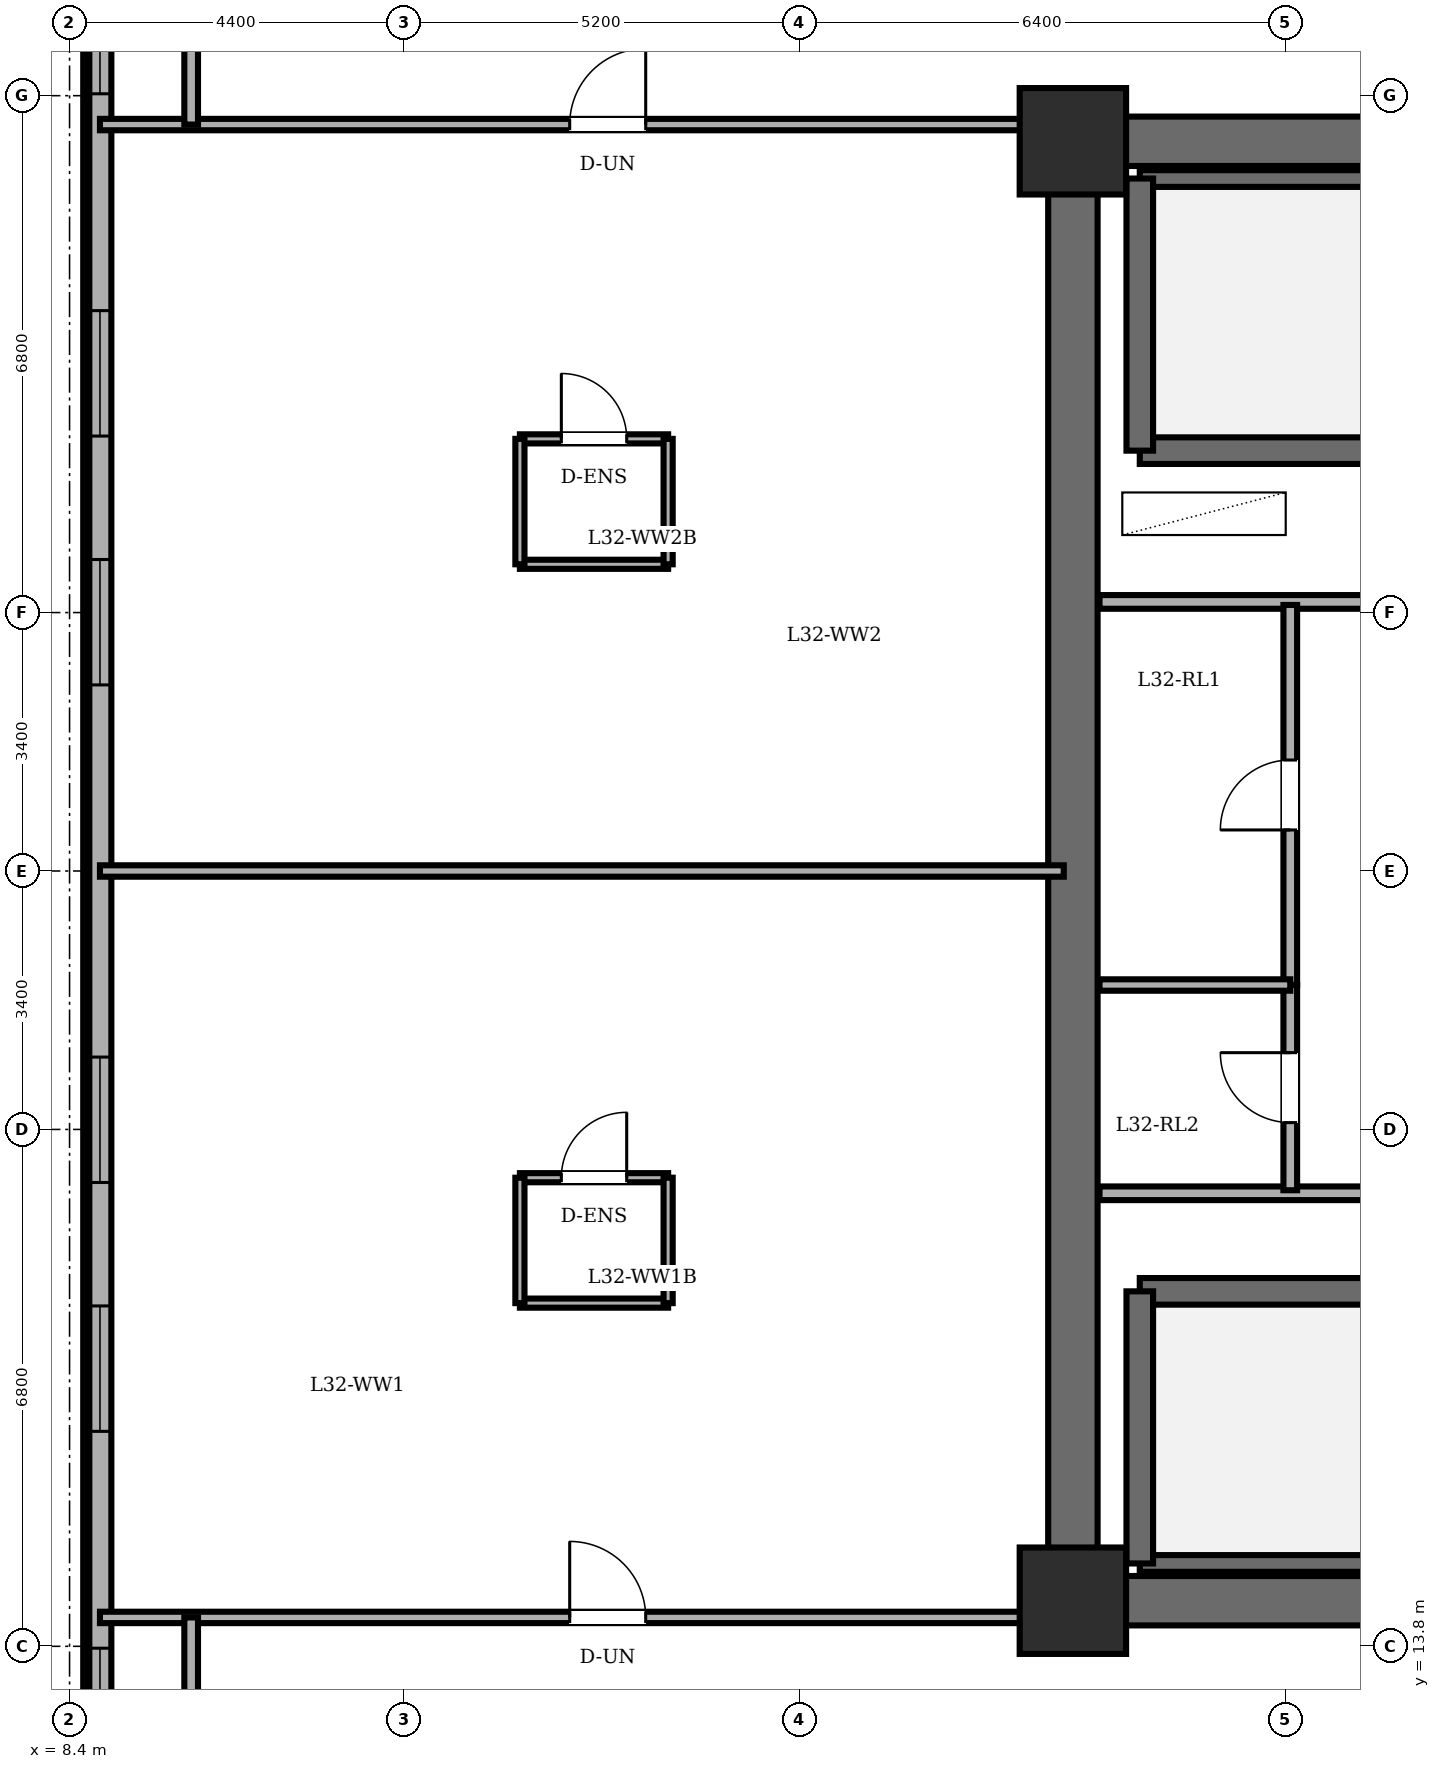
"""IFC4 building model, lengths in metres.
Left out: names, types, materials, properties, quantities, classifications, styles, units other than length and angle.
Written with IfcOpenShell. Run it as: python <this file> out.ifc"""

import sys

from ifc_helpers import new_model, si_unit, direction, frame, frame_2d, origin, origin_2d, place, context, subcontext, project, spatial, rectangle, extrude, element, fill, save


model = new_model("IFC4")
c1 = context("Model", 3, precision=1e-05, world=origin(), true_north=direction((0.0, 1.0)))
c2 = subcontext(c1, "Body", "Model", "MODEL_VIEW")
j1 = project(units=[si_unit("LENGTHUNIT", "METRE"), si_unit("PLANEANGLEUNIT", "RADIAN")], contexts=[c1])
p1 = place(None, origin())
s1 = spatial("IfcSite", under=j1, at=p1, CompositionType="ELEMENT")
p2 = place(p1, origin())
s2 = spatial("IfcBuilding", under=s1, at=p2, CompositionType="ELEMENT")
p3 = place(p2, frame((0.0, 0.0, 122.3)))
s3 = spatial("IfcBuildingStorey", under=s2, at=p3, CompositionType="ELEMENT", Elevation=122.3)
for number, where, z_axis, x_axis in (
    (1, (21.6, 14.4, 0.0), (0.0, 0.0, 1.0), (1.0, 0.0, 0.0)),
    (2, (21.6, 33.6, 0.0), (0.0, 0.0, 1.0), (1.0, 0.0, 0.0)),
):
    element("IfcColumn", number, at=place(p3, frame(where, z_axis=z_axis, x_axis=x_axis)), inside=s3, PredefinedType="COLUMN", context=c2, shape_type="SweptSolid", body=[
        extrude(rectangle(XDim=1.4, YDim=1.4, at=origin_2d()), origin(), (0.0, 0.0, 1.0), 3.6),
    ])
p4 = place(p3, frame((8.8, 38.2, 0.0), z_axis=(0.0, 0.0, 1.0), x_axis=(0.0, -1.0, 0.0)))
e3 = element("IfcWall", 3, at=p4, inside=s3, PredefinedType="SOLIDWALL", context=c2, shape_type="SweptSolid", body=[
    extrude(rectangle(XDim=28.4, YDim=0.3, at=frame_2d((14.2, 0.0))), origin(), (0.0, 0.0, 1.0), 3.4),
])
p5 = place(p4, frame((2.325, 0.0, 0.85)))
e4 = element("IfcOpeningElement", 4, at=p5, cuts=e3, PredefinedType="OPENING", context=c2, shape_type="SweptSolid", body=[
    extrude(rectangle(XDim=1.65, YDim=1.55, at=frame_2d((0.825, 0.775))), frame((0.0, 0.16, 0.0), z_axis=(0.0, -1.0, 0.0), x_axis=(1.0, 0.0, 0.0)), (0.0, 0.0, 1.0), 0.32),
])
p6 = place(p4, frame((6.828, 0.0, 0.85)))
e5 = element("IfcOpeningElement", 5, at=p6, cuts=e3, PredefinedType="OPENING", context=c2, shape_type="SweptSolid", body=[
    extrude(rectangle(XDim=1.65, YDim=1.55, at=frame_2d((0.825, 0.775))), frame((0.0, 0.16, 0.0), z_axis=(0.0, -1.0, 0.0), x_axis=(1.0, 0.0, 0.0)), (0.0, 0.0, 1.0), 0.32),
])
p7 = place(p4, frame((10.102, 0.0, 0.85)))
e6 = element("IfcOpeningElement", 6, at=p7, cuts=e3, PredefinedType="OPENING", context=c2, shape_type="SweptSolid", body=[
    extrude(rectangle(XDim=1.65, YDim=1.55, at=frame_2d((0.825, 0.775))), frame((0.0, 0.16, 0.0), z_axis=(0.0, -1.0, 0.0), x_axis=(1.0, 0.0, 0.0)), (0.0, 0.0, 1.0), 0.32),
])
p8 = place(p4, frame((16.648, 0.0, 0.85)))
e7 = element("IfcOpeningElement", 7, at=p8, cuts=e3, PredefinedType="OPENING", context=c2, shape_type="SweptSolid", body=[
    extrude(rectangle(XDim=1.65, YDim=1.55, at=frame_2d((0.825, 0.775))), frame((0.0, 0.16, 0.0), z_axis=(0.0, -1.0, 0.0), x_axis=(1.0, 0.0, 0.0)), (0.0, 0.0, 1.0), 0.32),
])
p9 = place(p4, frame((19.922, 0.0, 0.85)))
e8 = element("IfcOpeningElement", 8, at=p9, cuts=e3, PredefinedType="OPENING", context=c2, shape_type="SweptSolid", body=[
    extrude(rectangle(XDim=1.65, YDim=1.55, at=frame_2d((0.825, 0.775))), frame((0.0, 0.16, 0.0), z_axis=(0.0, -1.0, 0.0), x_axis=(1.0, 0.0, 0.0)), (0.0, 0.0, 1.0), 0.32),
])
p10 = place(p4, frame((24.425, 0.0, 0.85)))
e9 = element("IfcOpeningElement", 9, at=p10, cuts=e3, PredefinedType="OPENING", context=c2, shape_type="SweptSolid", body=[
    extrude(rectangle(XDim=1.65, YDim=1.55, at=frame_2d((0.825, 0.775))), frame((0.0, 0.16, 0.0), z_axis=(0.0, -1.0, 0.0), x_axis=(1.0, 0.0, 0.0)), (0.0, 0.0, 1.0), 0.32),
])
p11 = place(p3, frame((21.6, 14.4, 0.0), z_axis=(0.0, 0.0, 1.0), x_axis=(0.0, 1.0, 0.0)))
e10 = element("IfcWall", 10, at=p11, inside=s3, PredefinedType="SHEAR", context=c2, shape_type="SweptSolid", body=[
    extrude(rectangle(XDim=19.2, YDim=0.65, at=frame_2d((9.6, 0.0))), origin(), (0.0, 0.0, 1.0), 3.4),
])
for number, where, z_axis, x_axis in (
    (11, (21.6, 33.6, 0.0), (0.0, 0.0, 1.0), (1.0, 0.0, 0.0)),
    (12, (37.2, 14.4, 0.0), (0.0, 0.0, 1.0), (-1.0, 0.0, 0.0)),
):
    element("IfcWall", number, at=place(p3, frame(where, z_axis=z_axis, x_axis=x_axis)), inside=s3, PredefinedType="SHEAR", context=c2, shape_type="SweptSolid", body=[
        extrude(rectangle(XDim=15.6, YDim=0.65, at=frame_2d((7.8, 0.0))), origin(), (0.0, 0.0, 1.0), 3.4),
    ])
p12 = place(p3, frame((22.48, 29.53, 0.0), z_axis=(0.0, 0.0, 1.0), x_axis=(1.0, 0.0, 0.0)))
e13 = element("IfcWall", 13, at=p12, inside=s3, PredefinedType="SOLIDWALL", context=c2, shape_type="SweptSolid", body=[
    extrude(rectangle(XDim=7.79, YDim=0.35, at=frame_2d((3.895, 0.0))), origin(), (0.0, 0.0, 1.0), 3.4),
])
p13 = place(p3, frame((22.48, 33.11, 0.0), z_axis=(0.0, 0.0, 1.0), x_axis=(1.0, 0.0, 0.0)))
e14 = element("IfcWall", 14, at=p13, inside=s3, PredefinedType="PARTITIONING", context=c2, shape_type="SweptSolid", body=[
    extrude(rectangle(XDim=7.79, YDim=0.22, at=frame_2d((3.895, 0.0))), origin(), (0.0, 0.0, 1.0), 3.4),
])
p14 = place(p3, frame((22.48, 29.53, 0.0), z_axis=(0.0, 0.0, 1.0), x_axis=(0.0, 1.0, 0.0)))
e15 = element("IfcWall", 15, at=p14, inside=s3, PredefinedType="SOLIDWALL", context=c2, shape_type="SweptSolid", body=[
    extrude(rectangle(XDim=3.58, YDim=0.35, at=frame_2d((1.79, 0.0))), origin(), (0.0, 0.0, 1.0), 3.4),
])
p15 = place(p3, frame((22.48, 18.47, 0.0), z_axis=(0.0, 0.0, 1.0), x_axis=(1.0, 0.0, 0.0)))
e16 = element("IfcWall", 16, at=p15, inside=s3, PredefinedType="SOLIDWALL", context=c2, shape_type="SweptSolid", body=[
    extrude(rectangle(XDim=7.79, YDim=0.35, at=frame_2d((3.895, 0.0))), origin(), (0.0, 0.0, 1.0), 3.4),
])
p16 = place(p3, frame((22.48, 14.89, 0.0), z_axis=(0.0, 0.0, 1.0), x_axis=(1.0, 0.0, 0.0)))
e17 = element("IfcWall", 17, at=p16, inside=s3, PredefinedType="PARTITIONING", context=c2, shape_type="SweptSolid", body=[
    extrude(rectangle(XDim=7.79, YDim=0.22, at=frame_2d((3.895, 0.0))), origin(), (0.0, 0.0, 1.0), 3.4),
])
p17 = place(p3, frame((22.48, 14.89, 0.0), z_axis=(0.0, 0.0, 1.0), x_axis=(0.0, 1.0, 0.0)))
e18 = element("IfcWall", 18, at=p17, inside=s3, PredefinedType="SOLIDWALL", context=c2, shape_type="SweptSolid", body=[
    extrude(rectangle(XDim=3.58, YDim=0.35, at=frame_2d((1.79, 0.0))), origin(), (0.0, 0.0, 1.0), 3.4),
])
p18 = place(p3, frame((21.95, 27.54, 0.0), z_axis=(0.0, 0.0, 1.0), x_axis=(1.0, 0.0, 0.0)))
e19 = element("IfcWall", 19, at=p18, inside=s3, PredefinedType="PARTITIONING", context=c2, shape_type="SweptSolid", body=[
    extrude(rectangle(XDim=10.56, YDim=0.18, at=frame_2d((5.28, 0.0))), origin(), (0.0, 0.0, 1.0), 3.4),
])
p19 = place(p3, frame((21.95, 19.76, 0.0), z_axis=(0.0, 0.0, 1.0), x_axis=(1.0, 0.0, 0.0)))
e20 = element("IfcWall", 20, at=p19, inside=s3, PredefinedType="PARTITIONING", context=c2, shape_type="SweptSolid", body=[
    extrude(rectangle(XDim=14.87, YDim=0.18, at=frame_2d((7.435, 0.0))), origin(), (0.0, 0.0, 1.0), 3.4),
])
p20 = place(p3, frame((24.46, 22.5, 0.0), z_axis=(0.0, 0.0, 1.0), x_axis=(0.0, 1.0, 0.0)))
e21 = element("IfcWall", 21, at=p20, inside=s3, PredefinedType="PARTITIONING", context=c2, shape_type="SweptSolid", body=[
    extrude(rectangle(XDim=5.0, YDim=0.18, at=frame_2d((2.5, 0.0))), origin(), (0.0, 0.0, 1.0), 3.4),
])
p21 = place(p20, frame((2.04, 0.0, 0.0)))
e22 = element("IfcOpeningElement", 22, at=p21, cuts=e21, PredefinedType="OPENING", context=c2, shape_type="SweptSolid", body=[
    extrude(rectangle(XDim=0.92, YDim=2.1, at=frame_2d((0.46, 1.05))), frame((0.0, 0.1, 0.0), z_axis=(0.0, -1.0, 0.0), x_axis=(1.0, 0.0, 0.0)), (0.0, 0.0, 1.0), 0.2),
])
p22 = place(p3, frame((24.46, 19.8, 0.0), z_axis=(0.0, 0.0, 1.0), x_axis=(0.0, 1.0, 0.0)))
e23 = element("IfcWall", 23, at=p22, inside=s3, PredefinedType="PARTITIONING", context=c2, shape_type="SweptSolid", body=[
    extrude(rectangle(XDim=2.7, YDim=0.18, at=frame_2d((1.35, 0.0))), origin(), (0.0, 0.0, 1.0), 3.4),
])
p23 = place(p22, frame((0.89, 0.0, 0.0)))
e24 = element("IfcOpeningElement", 24, at=p23, cuts=e23, PredefinedType="OPENING", context=c2, shape_type="SweptSolid", body=[
    extrude(rectangle(XDim=0.92, YDim=2.1, at=frame_2d((0.46, 1.05))), frame((0.0, 0.1, 0.0), z_axis=(0.0, -1.0, 0.0), x_axis=(1.0, 0.0, 0.0)), (0.0, 0.0, 1.0), 0.2),
])
p24 = place(p3, frame((21.95, 22.5, 0.0), z_axis=(0.0, 0.0, 1.0), x_axis=(1.0, 0.0, 0.0)))
e25 = element("IfcWall", 25, at=p24, inside=s3, PredefinedType="PARTITIONING", context=c2, shape_type="SweptSolid", body=[
    extrude(rectangle(XDim=2.51, YDim=0.15, at=frame_2d((1.255, 0.0))), origin(), (0.0, 0.0, 1.0), 3.4),
])
p25 = place(p3, frame((14.325, 19.965, 0.0), z_axis=(0.0, 0.0, 1.0), x_axis=(1.0, 0.0, 0.0)))
e26 = element("IfcWall", 26, at=p25, inside=s3, PredefinedType="PARTITIONING", context=c2, shape_type="SweptSolid", body=[
    extrude(rectangle(XDim=1.95, YDim=0.12, at=frame_2d((0.975, 0.0))), origin(), (0.0, 0.0, 1.0), 3.4),
])
p26 = place(p25, frame((0.545, 0.0, 0.0)))
e27 = element("IfcOpeningElement", 27, at=p26, cuts=e26, PredefinedType="OPENING", context=c2, shape_type="SweptSolid", body=[
    extrude(rectangle(XDim=0.86, YDim=2.1, at=frame_2d((0.43, 1.05))), frame((0.0, 0.07, 0.0), z_axis=(0.0, -1.0, 0.0), x_axis=(1.0, 0.0, 0.0)), (0.0, 0.0, 1.0), 0.14),
])
p27 = place(p3, frame((16.275, 18.315, 0.0), z_axis=(0.0, 0.0, 1.0), x_axis=(-1.0, 0.0, 0.0)))
e28 = element("IfcWall", 28, at=p27, inside=s3, PredefinedType="PARTITIONING", context=c2, shape_type="SweptSolid", body=[
    extrude(rectangle(XDim=1.95, YDim=0.12, at=frame_2d((0.975, 0.0))), origin(), (0.0, 0.0, 1.0), 3.4),
])
for number, where, z_axis, x_axis in (
    (29, (14.325, 19.965, 0.0), (0.0, 0.0, 1.0), (0.0, -1.0, 0.0)),
    (30, (16.275, 18.315, 0.0), (0.0, 0.0, 1.0), (0.0, 1.0, 0.0)),
):
    element("IfcWall", number, at=place(p3, frame(where, z_axis=z_axis, x_axis=x_axis)), inside=s3, PredefinedType="PARTITIONING", context=c2, shape_type="SweptSolid", body=[
        extrude(rectangle(XDim=1.65, YDim=0.12, at=frame_2d((0.825, 0.0))), origin(), (0.0, 0.0, 1.0), 3.4),
    ])
p28 = place(p3, frame((14.325, 29.685, 0.0), z_axis=(0.0, 0.0, 1.0), x_axis=(1.0, 0.0, 0.0)))
e31 = element("IfcWall", 31, at=p28, inside=s3, PredefinedType="PARTITIONING", context=c2, shape_type="SweptSolid", body=[
    extrude(rectangle(XDim=1.95, YDim=0.12, at=frame_2d((0.975, 0.0))), origin(), (0.0, 0.0, 1.0), 3.4),
])
p29 = place(p28, frame((0.545, 0.0, 0.0)))
e32 = element("IfcOpeningElement", 32, at=p29, cuts=e31, PredefinedType="OPENING", context=c2, shape_type="SweptSolid", body=[
    extrude(rectangle(XDim=0.86, YDim=2.1, at=frame_2d((0.43, 1.05))), frame((0.0, 0.07, 0.0), z_axis=(0.0, -1.0, 0.0), x_axis=(1.0, 0.0, 0.0)), (0.0, 0.0, 1.0), 0.14),
])
p30 = place(p3, frame((16.275, 28.035, 0.0), z_axis=(0.0, 0.0, 1.0), x_axis=(-1.0, 0.0, 0.0)))
e33 = element("IfcWall", 33, at=p30, inside=s3, PredefinedType="PARTITIONING", context=c2, shape_type="SweptSolid", body=[
    extrude(rectangle(XDim=1.95, YDim=0.12, at=frame_2d((0.975, 0.0))), origin(), (0.0, 0.0, 1.0), 3.4),
])
for number, where, z_axis, x_axis in (
    (34, (14.325, 29.685, 0.0), (0.0, 0.0, 1.0), (0.0, -1.0, 0.0)),
    (35, (16.275, 28.035, 0.0), (0.0, 0.0, 1.0), (0.0, 1.0, 0.0)),
):
    element("IfcWall", number, at=place(p3, frame(where, z_axis=z_axis, x_axis=x_axis)), inside=s3, PredefinedType="PARTITIONING", context=c2, shape_type="SweptSolid", body=[
        extrude(rectangle(XDim=1.65, YDim=0.12, at=frame_2d((0.825, 0.0))), origin(), (0.0, 0.0, 1.0), 3.4),
    ])
p31 = place(p3, frame((8.8, 14.18, 0.0), z_axis=(0.0, 0.0, 1.0), x_axis=(1.0, 0.0, 0.0)))
e36 = element("IfcWall", 36, at=p31, inside=s3, PredefinedType="PARTITIONING", context=c2, shape_type="SweptSolid", body=[
    extrude(rectangle(XDim=12.68, YDim=0.15, at=frame_2d((6.34, 0.0))), origin(), (0.0, 0.0, 1.0), 3.4),
])
p32 = place(p31, frame((6.18, 0.0, 0.0)))
e37 = element("IfcOpeningElement", 37, at=p32, cuts=e36, PredefinedType="OPENING", context=c2, shape_type="SweptSolid", body=[
    extrude(rectangle(XDim=1.0, YDim=2.15, at=frame_2d((0.5, 1.075))), frame((0.0, 0.085, 0.0), z_axis=(0.0, -1.0, 0.0), x_axis=(1.0, 0.0, 0.0)), (0.0, 0.0, 1.0), 0.17),
])
p33 = place(p3, frame((8.8, 24.0, 0.0), z_axis=(0.0, 0.0, 1.0), x_axis=(1.0, 0.0, 0.0)))
e38 = element("IfcWall", 38, at=p33, inside=s3, PredefinedType="PARTITIONING", context=c2, shape_type="SweptSolid", body=[
    extrude(rectangle(XDim=12.68, YDim=0.15, at=frame_2d((6.34, 0.0))), origin(), (0.0, 0.0, 1.0), 3.4),
])
p34 = place(p3, frame((8.8, 33.82, 0.0), z_axis=(0.0, 0.0, 1.0), x_axis=(1.0, 0.0, 0.0)))
e39 = element("IfcWall", 39, at=p34, inside=s3, PredefinedType="PARTITIONING", context=c2, shape_type="SweptSolid", body=[
    extrude(rectangle(XDim=12.68, YDim=0.15, at=frame_2d((6.34, 0.0))), origin(), (0.0, 0.0, 1.0), 3.4),
])
p35 = place(p34, frame((6.18, 0.0, 0.0)))
e40 = element("IfcOpeningElement", 40, at=p35, cuts=e39, PredefinedType="OPENING", context=c2, shape_type="SweptSolid", body=[
    extrude(rectangle(XDim=1.0, YDim=2.15, at=frame_2d((0.5, 1.075))), frame((0.0, 0.085, 0.0), z_axis=(0.0, -1.0, 0.0), x_axis=(1.0, 0.0, 0.0)), (0.0, 0.0, 1.0), 0.17),
])
for number, where, z_axis, x_axis in (
    (41, (10.0, 11.72, 0.0), (0.0, 0.0, 1.0), (0.0, 1.0, 0.0)),
    (42, (10.0, 33.82, 0.0), (0.0, 0.0, 1.0), (0.0, 1.0, 0.0)),
):
    element("IfcWall", number, at=place(p3, frame(where, z_axis=z_axis, x_axis=x_axis)), inside=s3, PredefinedType="PARTITIONING", context=c2, shape_type="SweptSolid", body=[
        extrude(rectangle(XDim=2.46, YDim=0.18, at=frame_2d((1.23, 0.0))), origin(), (0.0, 0.0, 1.0), 3.4),
    ])
p36 = place(p5, origin())
e43 = element("IfcWindow", 43, at=p36, inside=s3, PartitioningType="DOUBLE_PANEL_VERTICAL", PredefinedType="WINDOW", context=c2, shape_type="SweptSolid", body=[
    extrude(rectangle(XDim=1.65, YDim=1.55, at=frame_2d((0.825, 0.775))), frame((0.0, 0.03, 0.0), z_axis=(0.0, -1.0, 0.0), x_axis=(1.0, 0.0, 0.0)), (0.0, 0.0, 1.0), 0.06),
])
fill(e4, e43)
p37 = place(p6, origin())
e44 = element("IfcWindow", 44, at=p37, inside=s3, PartitioningType="DOUBLE_PANEL_VERTICAL", PredefinedType="WINDOW", context=c2, shape_type="SweptSolid", body=[
    extrude(rectangle(XDim=1.65, YDim=1.55, at=frame_2d((0.825, 0.775))), frame((0.0, 0.03, 0.0), z_axis=(0.0, -1.0, 0.0), x_axis=(1.0, 0.0, 0.0)), (0.0, 0.0, 1.0), 0.06),
])
fill(e5, e44)
p38 = place(p7, origin())
e45 = element("IfcWindow", 45, at=p38, inside=s3, PartitioningType="DOUBLE_PANEL_VERTICAL", PredefinedType="WINDOW", context=c2, shape_type="SweptSolid", body=[
    extrude(rectangle(XDim=1.65, YDim=1.55, at=frame_2d((0.825, 0.775))), frame((0.0, 0.03, 0.0), z_axis=(0.0, -1.0, 0.0), x_axis=(1.0, 0.0, 0.0)), (0.0, 0.0, 1.0), 0.06),
])
fill(e6, e45)
p39 = place(p8, origin())
e46 = element("IfcWindow", 46, at=p39, inside=s3, PartitioningType="DOUBLE_PANEL_VERTICAL", PredefinedType="WINDOW", context=c2, shape_type="SweptSolid", body=[
    extrude(rectangle(XDim=1.65, YDim=1.55, at=frame_2d((0.825, 0.775))), frame((0.0, 0.03, 0.0), z_axis=(0.0, -1.0, 0.0), x_axis=(1.0, 0.0, 0.0)), (0.0, 0.0, 1.0), 0.06),
])
fill(e7, e46)
p40 = place(p9, origin())
e47 = element("IfcWindow", 47, at=p40, inside=s3, PartitioningType="DOUBLE_PANEL_VERTICAL", PredefinedType="WINDOW", context=c2, shape_type="SweptSolid", body=[
    extrude(rectangle(XDim=1.65, YDim=1.55, at=frame_2d((0.825, 0.775))), frame((0.0, 0.03, 0.0), z_axis=(0.0, -1.0, 0.0), x_axis=(1.0, 0.0, 0.0)), (0.0, 0.0, 1.0), 0.06),
])
fill(e8, e47)
p41 = place(p10, origin())
e48 = element("IfcWindow", 48, at=p41, inside=s3, PartitioningType="DOUBLE_PANEL_VERTICAL", PredefinedType="WINDOW", context=c2, shape_type="SweptSolid", body=[
    extrude(rectangle(XDim=1.65, YDim=1.55, at=frame_2d((0.825, 0.775))), frame((0.0, 0.03, 0.0), z_axis=(0.0, -1.0, 0.0), x_axis=(1.0, 0.0, 0.0)), (0.0, 0.0, 1.0), 0.06),
])
fill(e9, e48)
p42 = place(p21, origin())
e49 = element("IfcDoor", 49, at=p42, inside=s3, OperationType="SINGLE_SWING_LEFT", PredefinedType="DOOR", context=c2, shape_type="SweptSolid", body=[
    extrude(rectangle(XDim=0.92, YDim=2.1, at=frame_2d((0.46, 1.05))), frame((0.0, 0.025, 0.0), z_axis=(0.0, -1.0, 0.0), x_axis=(1.0, 0.0, 0.0)), (0.0, 0.0, 1.0), 0.05),
])
fill(e22, e49)
p43 = place(p23, origin())
e50 = element("IfcDoor", 50, at=p43, inside=s3, OperationType="SINGLE_SWING_RIGHT", PredefinedType="DOOR", context=c2, shape_type="SweptSolid", body=[
    extrude(rectangle(XDim=0.92, YDim=2.1, at=frame_2d((0.46, 1.05))), frame((0.0, 0.025, 0.0), z_axis=(0.0, -1.0, 0.0), x_axis=(1.0, 0.0, 0.0)), (0.0, 0.0, 1.0), 0.05),
])
fill(e24, e50)
p44 = place(p26, origin())
e51 = element("IfcDoor", 51, at=p44, inside=s3, OperationType="SINGLE_SWING_RIGHT", PredefinedType="DOOR", context=c2, shape_type="SweptSolid", body=[
    extrude(rectangle(XDim=0.86, YDim=2.1, at=frame_2d((0.43, 1.05))), frame((0.0, 0.025, 0.0), z_axis=(0.0, -1.0, 0.0), x_axis=(1.0, 0.0, 0.0)), (0.0, 0.0, 1.0), 0.05),
])
fill(e27, e51)
p45 = place(p29, origin())
e52 = element("IfcDoor", 52, at=p45, inside=s3, OperationType="SINGLE_SWING_LEFT", PredefinedType="DOOR", context=c2, shape_type="SweptSolid", body=[
    extrude(rectangle(XDim=0.86, YDim=2.1, at=frame_2d((0.43, 1.05))), frame((0.0, 0.025, 0.0), z_axis=(0.0, -1.0, 0.0), x_axis=(1.0, 0.0, 0.0)), (0.0, 0.0, 1.0), 0.05),
])
fill(e32, e52)
p46 = place(p32, origin())
e53 = element("IfcDoor", 53, at=p46, inside=s3, OperationType="SINGLE_SWING_LEFT", PredefinedType="DOOR", context=c2, shape_type="SweptSolid", body=[
    extrude(rectangle(XDim=1.0, YDim=2.15, at=frame_2d((0.5, 1.075))), frame((0.0, 0.025, 0.0), z_axis=(0.0, -1.0, 0.0), x_axis=(1.0, 0.0, 0.0)), (0.0, 0.0, 1.0), 0.05),
])
fill(e37, e53)
p47 = place(p35, origin())
e54 = element("IfcDoor", 54, at=p47, inside=s3, OperationType="SINGLE_SWING_RIGHT", PredefinedType="DOOR", context=c2, shape_type="SweptSolid", body=[
    extrude(rectangle(XDim=1.0, YDim=2.15, at=frame_2d((0.5, 1.075))), frame((0.0, 0.025, 0.0), z_axis=(0.0, -1.0, 0.0), x_axis=(1.0, 0.0, 0.0)), (0.0, 0.0, 1.0), 0.05),
])
fill(e40, e54)
save(model, sys.argv[1])
